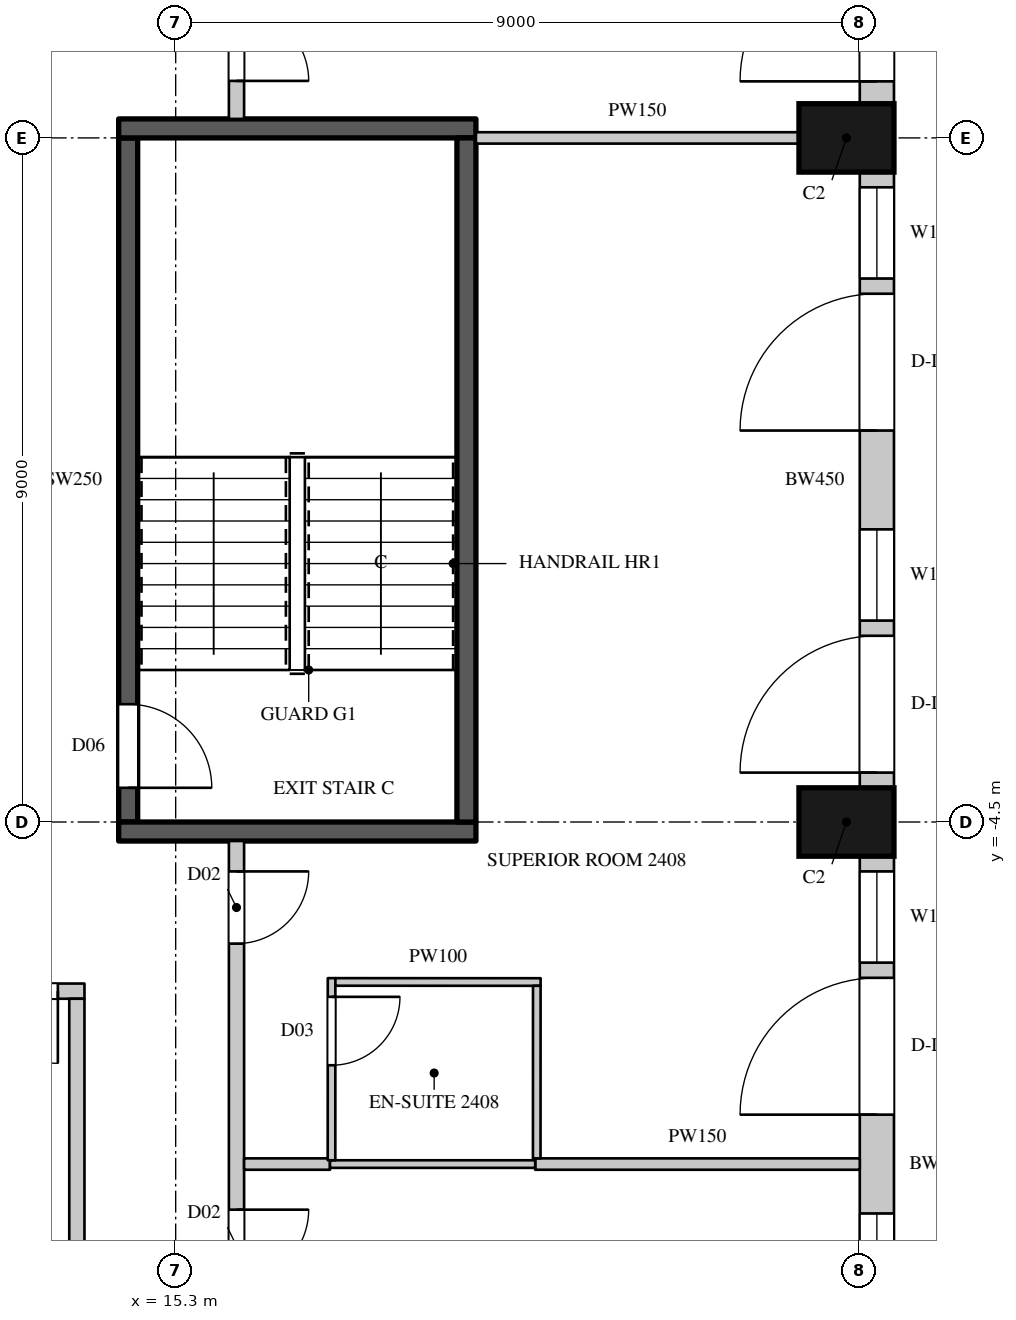
"""IFC4 building model, lengths in metres.
Left out: names, types, materials, properties, quantities, classifications, styles, units other than length and angle.
Written with IfcOpenShell. Run it as: python <this file> out.ifc"""

import sys

from ifc_helpers import new_model, si_unit, direction, frame, frame_2d, origin, origin_2d, place, context, subcontext, project, spatial, rectangle, extrude, element, fill, save


model = new_model("IFC4")
c1 = context("Model", 3, precision=1e-05, world=origin(), true_north=direction((0.0, 1.0)))
c2 = subcontext(c1, "Body", "Model", "MODEL_VIEW")
j1 = project(units=[si_unit("LENGTHUNIT", "METRE"), si_unit("PLANEANGLEUNIT", "RADIAN")], contexts=[c1])
p1 = place(None, origin())
s1 = spatial("IfcSite", under=j1, at=p1, CompositionType="ELEMENT")
p2 = place(p1, origin())
s2 = spatial("IfcBuilding", under=s1, at=p2, CompositionType="ELEMENT")
p3 = place(p2, frame((0.0, 0.0, 116.7)))
s3 = spatial("IfcBuildingStorey", under=s2, at=p3, CompositionType="ELEMENT", Elevation=116.7)
for number, where, z_axis, x_axis in (
    (1, (24.125, -4.5, 0.0), (0.0, 0.0, 1.0), (0.0, 1.0, 0.0)),
    (2, (24.125, 4.5, 0.0), (0.0, 0.0, 1.0), (0.0, 1.0, 0.0)),
):
    element("IfcColumn", number, at=place(p3, frame(where, z_axis=z_axis, x_axis=x_axis)), inside=s3, PredefinedType="COLUMN", context=c2, shape_type="SweptSolid", body=[
        extrude(rectangle(XDim=0.9, YDim=1.25, at=origin_2d()), origin(), (0.0, 0.0, 1.0), 3.6),
    ])
p4 = place(p3, frame((24.525, -13.05, 0.0), z_axis=(0.0, 0.0, 1.0), x_axis=(0.0, 1.0, 0.0)))
e3 = element("IfcWall", 3, at=p4, inside=s3, PredefinedType="SOLIDWALL", context=c2, shape_type="SweptSolid", body=[
    extrude(rectangle(XDim=8.1, YDim=0.45, at=frame_2d((4.05, 0.0))), origin(), (0.0, 0.0, 1.0), 3.3),
])
p5 = place(p4, frame((0.2, 0.0, 0.0)))
e4 = element("IfcOpeningElement", 4, at=p5, cuts=e3, PredefinedType="OPENING", context=c2, shape_type="SweptSolid", body=[
    extrude(rectangle(XDim=1.8, YDim=2.4, at=frame_2d((0.9, 1.2))), frame((0.0, 0.235, 0.0), z_axis=(0.0, -1.0, 0.0), x_axis=(1.0, 0.0, 0.0)), (0.0, 0.0, 1.0), 0.47),
])
p6 = place(p4, frame((2.2, 0.0, 1.05)))
e5 = element("IfcOpeningElement", 5, at=p6, cuts=e3, PredefinedType="OPENING", context=c2, shape_type="SweptSolid", body=[
    extrude(rectangle(XDim=1.2, YDim=2.0, at=frame_2d((0.6, 1.0))), frame((0.0, 0.235, 0.0), z_axis=(0.0, -1.0, 0.0), x_axis=(1.0, 0.0, 0.0)), (0.0, 0.0, 1.0), 0.47),
])
p7 = place(p4, frame((4.7, 0.0, 0.0)))
e6 = element("IfcOpeningElement", 6, at=p7, cuts=e3, PredefinedType="OPENING", context=c2, shape_type="SweptSolid", body=[
    extrude(rectangle(XDim=1.8, YDim=2.4, at=frame_2d((0.9, 1.2))), frame((0.0, 0.235, 0.0), z_axis=(0.0, -1.0, 0.0), x_axis=(1.0, 0.0, 0.0)), (0.0, 0.0, 1.0), 0.47),
])
p8 = place(p4, frame((6.7, 0.0, 1.05)))
e7 = element("IfcOpeningElement", 7, at=p8, cuts=e3, PredefinedType="OPENING", context=c2, shape_type="SweptSolid", body=[
    extrude(rectangle(XDim=1.2, YDim=2.0, at=frame_2d((0.6, 1.0))), frame((0.0, 0.235, 0.0), z_axis=(0.0, -1.0, 0.0), x_axis=(1.0, 0.0, 0.0)), (0.0, 0.0, 1.0), 0.47),
])
p9 = place(p3, frame((24.525, -4.05, 0.0), z_axis=(0.0, 0.0, 1.0), x_axis=(0.0, 1.0, 0.0)))
e8 = element("IfcWall", 8, at=p9, inside=s3, PredefinedType="SOLIDWALL", context=c2, shape_type="SweptSolid", body=[
    extrude(rectangle(XDim=8.1, YDim=0.45, at=frame_2d((4.05, 0.0))), origin(), (0.0, 0.0, 1.0), 3.3),
])
p10 = place(p9, frame((0.2, 0.0, 0.0)))
e9 = element("IfcOpeningElement", 9, at=p10, cuts=e8, PredefinedType="OPENING", context=c2, shape_type="SweptSolid", body=[
    extrude(rectangle(XDim=1.8, YDim=2.4, at=frame_2d((0.9, 1.2))), frame((0.0, 0.235, 0.0), z_axis=(0.0, -1.0, 0.0), x_axis=(1.0, 0.0, 0.0)), (0.0, 0.0, 1.0), 0.47),
])
p11 = place(p9, frame((2.2, 0.0, 1.05)))
e10 = element("IfcOpeningElement", 10, at=p11, cuts=e8, PredefinedType="OPENING", context=c2, shape_type="SweptSolid", body=[
    extrude(rectangle(XDim=1.2, YDim=2.0, at=frame_2d((0.6, 1.0))), frame((0.0, 0.235, 0.0), z_axis=(0.0, -1.0, 0.0), x_axis=(1.0, 0.0, 0.0)), (0.0, 0.0, 1.0), 0.47),
])
p12 = place(p9, frame((4.7, 0.0, 0.0)))
e11 = element("IfcOpeningElement", 11, at=p12, cuts=e8, PredefinedType="OPENING", context=c2, shape_type="SweptSolid", body=[
    extrude(rectangle(XDim=1.8, YDim=2.4, at=frame_2d((0.9, 1.2))), frame((0.0, 0.235, 0.0), z_axis=(0.0, -1.0, 0.0), x_axis=(1.0, 0.0, 0.0)), (0.0, 0.0, 1.0), 0.47),
])
p13 = place(p9, frame((6.7, 0.0, 1.05)))
e12 = element("IfcOpeningElement", 12, at=p13, cuts=e8, PredefinedType="OPENING", context=c2, shape_type="SweptSolid", body=[
    extrude(rectangle(XDim=1.2, YDim=2.0, at=frame_2d((0.6, 1.0))), frame((0.0, 0.235, 0.0), z_axis=(0.0, -1.0, 0.0), x_axis=(1.0, 0.0, 0.0)), (0.0, 0.0, 1.0), 0.47),
])
p14 = place(p3, frame((24.525, 4.95, 0.0), z_axis=(0.0, 0.0, 1.0), x_axis=(0.0, 1.0, 0.0)))
e13 = element("IfcWall", 13, at=p14, inside=s3, PredefinedType="SOLIDWALL", context=c2, shape_type="SweptSolid", body=[
    extrude(rectangle(XDim=8.439, YDim=0.45, at=frame_2d((4.219, 0.0))), origin(), (0.0, 0.0, 1.0), 3.3),
])
p15 = place(p14, frame((0.294, 0.0, 0.0)))
e14 = element("IfcOpeningElement", 14, at=p15, cuts=e13, PredefinedType="OPENING", context=c2, shape_type="SweptSolid", body=[
    extrude(rectangle(XDim=1.8, YDim=2.4, at=frame_2d((0.9, 1.2))), frame((0.0, 0.235, 0.0), z_axis=(0.0, -1.0, 0.0), x_axis=(1.0, 0.0, 0.0)), (0.0, 0.0, 1.0), 0.47),
])
p16 = place(p14, frame((2.294, 0.0, 1.05)))
e15 = element("IfcOpeningElement", 15, at=p16, cuts=e13, PredefinedType="OPENING", context=c2, shape_type="SweptSolid", body=[
    extrude(rectangle(XDim=1.2, YDim=2.0, at=frame_2d((0.6, 1.0))), frame((0.0, 0.235, 0.0), z_axis=(0.0, -1.0, 0.0), x_axis=(1.0, 0.0, 0.0)), (0.0, 0.0, 1.0), 0.47),
])
p17 = place(p14, frame((5.232, 0.0, 1.05)))
e16 = element("IfcOpeningElement", 16, at=p17, cuts=e13, PredefinedType="OPENING", context=c2, shape_type="SweptSolid", body=[
    extrude(rectangle(XDim=2.7, YDim=2.0, at=frame_2d((1.35, 1.0))), frame((0.0, 0.235, 0.0), z_axis=(0.0, -1.0, 0.0), x_axis=(1.0, 0.0, 0.0)), (0.0, 0.0, 1.0), 0.47),
])
p18 = place(p3, frame((10.5, -6.725, 0.0), z_axis=(0.0, 0.0, 1.0), x_axis=(1.0, 0.0, 0.0)))
e17 = element("IfcWall", 17, at=p18, inside=s3, PredefinedType="PARTITIONING", context=c2, shape_type="SweptSolid", body=[
    extrude(rectangle(XDim=3.6, YDim=0.2, at=frame_2d((1.8, 0.0))), origin(), (0.0, 0.0, 1.0), 3.3),
])
p19 = place(p18, frame((2.3, 0.0, 0.0)))
e18 = element("IfcOpeningElement", 18, at=p19, cuts=e17, PredefinedType="OPENING", context=c2, shape_type="SweptSolid", body=[
    extrude(rectangle(XDim=0.95, YDim=2.2, at=frame_2d((0.475, 1.1))), frame((0.0, 0.11, 0.0), z_axis=(0.0, -1.0, 0.0), x_axis=(1.0, 0.0, 0.0)), (0.0, 0.0, 1.0), 0.22),
])
p20 = place(p3, frame((14.0, -15.3, 0.0), z_axis=(0.0, 0.0, 1.0), x_axis=(0.0, 1.0, 0.0)))
e19 = element("IfcWall", 19, at=p20, inside=s3, PredefinedType="PARTITIONING", context=c2, shape_type="SweptSolid", body=[
    extrude(rectangle(XDim=8.475, YDim=0.2, at=frame_2d((4.238, 0.0))), origin(), (0.0, 0.0, 1.0), 3.3),
])
p21 = place(p3, frame((16.1, -17.5, 0.0), z_axis=(0.0, 0.0, 1.0), x_axis=(0.0, 1.0, 0.0)))
e20 = element("IfcWall", 20, at=p21, inside=s3, PredefinedType="PARTITIONING", context=c2, shape_type="SweptSolid", body=[
    extrude(rectangle(XDim=12.75, YDim=0.2, at=frame_2d((6.375, 0.0))), origin(), (0.0, 0.0, 1.0), 3.3),
])
p22 = place(p21, frame((2.75, 0.0, 0.0)))
e21 = element("IfcOpeningElement", 21, at=p22, cuts=e20, PredefinedType="OPENING", context=c2, shape_type="SweptSolid", body=[
    extrude(rectangle(XDim=0.95, YDim=2.2, at=frame_2d((0.475, 1.1))), frame((0.0, 0.11, 0.0), z_axis=(0.0, -1.0, 0.0), x_axis=(1.0, 0.0, 0.0)), (0.0, 0.0, 1.0), 0.22),
])
p23 = place(p21, frame((6.95, 0.0, 0.0)))
e22 = element("IfcOpeningElement", 22, at=p23, cuts=e20, PredefinedType="OPENING", context=c2, shape_type="SweptSolid", body=[
    extrude(rectangle(XDim=0.95, YDim=2.2, at=frame_2d((0.475, 1.1))), frame((0.0, 0.11, 0.0), z_axis=(0.0, -1.0, 0.0), x_axis=(1.0, 0.0, 0.0)), (0.0, 0.0, 1.0), 0.22),
])
p24 = place(p21, frame((11.4, 0.0, 0.0)))
e23 = element("IfcOpeningElement", 23, at=p24, cuts=e20, PredefinedType="OPENING", context=c2, shape_type="SweptSolid", body=[
    extrude(rectangle(XDim=0.95, YDim=2.2, at=frame_2d((0.475, 1.1))), frame((0.0, 0.11, 0.0), z_axis=(0.0, -1.0, 0.0), x_axis=(1.0, 0.0, 0.0)), (0.0, 0.0, 1.0), 0.22),
])
p25 = place(p3, frame((16.1, 4.75, 0.0), z_axis=(0.0, 0.0, 1.0), x_axis=(0.0, 1.0, 0.0)))
e24 = element("IfcWall", 24, at=p25, inside=s3, PredefinedType="PARTITIONING", context=c2, shape_type="SweptSolid", body=[
    extrude(rectangle(XDim=12.65, YDim=0.2, at=frame_2d((6.325, 0.0))), origin(), (0.0, 0.0, 1.0), 3.3),
])
p26 = place(p25, frame((0.5, 0.0, 0.0)))
e25 = element("IfcOpeningElement", 25, at=p26, cuts=e24, PredefinedType="OPENING", context=c2, shape_type="SweptSolid", body=[
    extrude(rectangle(XDim=0.95, YDim=2.2, at=frame_2d((0.475, 1.1))), frame((0.0, 0.11, 0.0), z_axis=(0.0, -1.0, 0.0), x_axis=(1.0, 0.0, 0.0)), (0.0, 0.0, 1.0), 0.22),
])
p27 = place(p25, frame((6.9, 0.0, 0.0)))
e26 = element("IfcOpeningElement", 26, at=p27, cuts=e24, PredefinedType="OPENING", context=c2, shape_type="SweptSolid", body=[
    extrude(rectangle(XDim=0.95, YDim=2.2, at=frame_2d((0.475, 1.1))), frame((0.0, 0.11, 0.0), z_axis=(0.0, -1.0, 0.0), x_axis=(1.0, 0.0, 0.0)), (0.0, 0.0, 1.0), 0.22),
])
p28 = place(p3, frame((16.2, -9.0, 0.0), z_axis=(0.0, 0.0, 1.0), x_axis=(1.0, 0.0, 0.0)))
e27 = element("IfcWall", 27, at=p28, inside=s3, PredefinedType="PARTITIONING", context=c2, shape_type="SweptSolid", body=[
    extrude(rectangle(XDim=1.13, YDim=0.15, at=frame_2d((0.565, 0.0))), origin(), (0.0, 0.0, 1.0), 2.65),
])
p29 = place(p3, frame((19.25, 4.5, 0.0), z_axis=(0.0, 0.0, 1.0), x_axis=(1.0, 0.0, 0.0)))
e28 = element("IfcWall", 28, at=p29, inside=s3, PredefinedType="PARTITIONING", context=c2, shape_type="SweptSolid", body=[
    extrude(rectangle(XDim=4.25, YDim=0.15, at=frame_2d((2.125, 0.0))), origin(), (0.0, 0.0, 1.0), 3.3),
])
p30 = place(p3, frame((20.03, -9.0, 0.0), z_axis=(0.0, 0.0, 1.0), x_axis=(1.0, 0.0, 0.0)))
e29 = element("IfcWall", 29, at=p30, inside=s3, PredefinedType="PARTITIONING", context=c2, shape_type="SweptSolid", body=[
    extrude(rectangle(XDim=4.27, YDim=0.15, at=frame_2d((2.135, 0.0))), origin(), (0.0, 0.0, 1.0), 2.65),
])
p31 = place(p3, frame((14.675, -4.5, 0.0), z_axis=(0.0, 0.0, 1.0), x_axis=(0.0, 1.0, 0.0)))
e30 = element("IfcWall", 30, at=p31, inside=s3, PredefinedType="SHEAR", context=c2, shape_type="SweptSolid", body=[
    extrude(rectangle(XDim=9.0, YDim=0.25, at=frame_2d((4.5, 0.0))), origin(), (0.0, 0.0, 1.0), 3.3),
])
p32 = place(p31, frame((0.45, 0.0, 0.0)))
e31 = element("IfcOpeningElement", 31, at=p32, cuts=e30, PredefinedType="OPENING", context=c2, shape_type="SweptSolid", body=[
    extrude(rectangle(XDim=1.1, YDim=2.2, at=frame_2d((0.55, 1.1))), frame((0.0, 0.135, 0.0), z_axis=(0.0, -1.0, 0.0), x_axis=(1.0, 0.0, 0.0)), (0.0, 0.0, 1.0), 0.27),
])
for number, where, z_axis, x_axis in (
    (32, (14.55, -4.625, 0.0), (0.0, 0.0, 1.0), (1.0, 0.0, 0.0)),
    (33, (14.55, 4.625, 0.0), (0.0, 0.0, 1.0), (1.0, 0.0, 0.0)),
):
    element("IfcWall", number, at=place(p3, frame(where, z_axis=z_axis, x_axis=x_axis)), inside=s3, PredefinedType="SHEAR", context=c2, shape_type="SweptSolid", body=[
        extrude(rectangle(XDim=4.7, YDim=0.25, at=frame_2d((2.35, 0.0))), origin(), (0.0, 0.0, 1.0), 3.3),
    ])
p33 = place(p3, frame((19.125, -4.5, 0.0), z_axis=(0.0, 0.0, 1.0), x_axis=(0.0, 1.0, 0.0)))
e34 = element("IfcWall", 34, at=p33, inside=s3, PredefinedType="SHEAR", context=c2, shape_type="SweptSolid", body=[
    extrude(rectangle(XDim=9.0, YDim=0.25, at=frame_2d((4.5, 0.0))), origin(), (0.0, 0.0, 1.0), 3.3),
])
p34 = place(p3, frame((17.33, -9.0, 0.0), z_axis=(0.0, 0.0, 1.0), x_axis=(1.0, 0.0, 0.0)))
e35 = element("IfcWall", 35, at=p34, inside=s3, PredefinedType="PARTITIONING", context=c2, shape_type="SweptSolid", body=[
    extrude(rectangle(XDim=2.7, YDim=0.1, at=frame_2d((1.35, 0.0))), origin(), (0.0, 0.0, 1.0), 2.65),
])
p35 = place(p3, frame((17.35, -8.95, 0.0), z_axis=(0.0, 0.0, 1.0), x_axis=(0.000407580973, 0.999999916939, 0.0)))
e36 = element("IfcWall", 36, at=p35, inside=s3, PredefinedType="PARTITIONING", context=c2, shape_type="SweptSolid", body=[
    extrude(rectangle(XDim=2.396, YDim=0.1, at=frame_2d((1.198, 0.0))), origin(), (0.0, 0.0, 1.0), 3.3),
])
p36 = place(p35, frame((1.25, 0.0, 0.0)))
e37 = element("IfcOpeningElement", 37, at=p36, cuts=e36, PredefinedType="OPENING", context=c2, shape_type="SweptSolid", body=[
    extrude(rectangle(XDim=0.9, YDim=2.2, at=frame_2d((0.45, 1.1))), frame((0.0, 0.06, 0.0), z_axis=(0.0, -1.0, 0.0), x_axis=(1.0, 0.0, 0.0)), (0.0, 0.0, 1.0), 0.12),
])
p37 = place(p3, frame((17.401, -6.604, 0.0), z_axis=(0.0, 0.0, 1.0), x_axis=(0.9999999346, -0.000361663629, 0.0)))
e38 = element("IfcWall", 38, at=p37, inside=s3, PredefinedType="PARTITIONING", context=c2, shape_type="SweptSolid", body=[
    extrude(rectangle(XDim=2.7, YDim=0.1, at=frame_2d((1.35, 0.0))), origin(), (0.0, 0.0, 1.0), 3.3),
])
p38 = place(p3, frame((20.05, -8.925, 0.0), z_axis=(0.0, 0.0, 1.0), x_axis=(0.000430200003, 0.999999907464, 0.0)))
e39 = element("IfcWall", 39, at=p38, inside=s3, PredefinedType="PARTITIONING", context=c2, shape_type="SweptSolid", body=[
    extrude(rectangle(XDim=2.27, YDim=0.1, at=frame_2d((1.135, 0.0))), origin(), (0.0, 0.0, 1.0), 3.3),
])
p39 = place(p6, origin())
e40 = element("IfcWindow", 40, at=p39, inside=s3, PartitioningType="SINGLE_PANEL", PredefinedType="WINDOW", context=c2, shape_type="SweptSolid", body=[
    extrude(rectangle(XDim=1.2, YDim=2.0, at=frame_2d((0.6, 1.0))), frame((0.0, 0.135, 0.0), z_axis=(0.0, -1.0, 0.0), x_axis=(1.0, 0.0, 0.0)), (0.0, 0.0, 1.0), 0.06),
])
fill(e5, e40)
p40 = place(p7, origin())
e41 = element("IfcDoor", 41, at=p40, inside=s3, OperationType="SLIDING_TO_LEFT", PredefinedType="DOOR", context=c2, shape_type="SweptSolid", body=[
    extrude(rectangle(XDim=1.8, YDim=2.4, at=frame_2d((0.9, 1.2))), frame((0.0, 0.13, 0.0), z_axis=(0.0, -1.0, 0.0), x_axis=(1.0, 0.0, 0.0)), (0.0, 0.0, 1.0), 0.05),
])
fill(e6, e41)
p41 = place(p8, origin())
e42 = element("IfcWindow", 42, at=p41, inside=s3, PartitioningType="SINGLE_PANEL", PredefinedType="WINDOW", context=c2, shape_type="SweptSolid", body=[
    extrude(rectangle(XDim=1.2, YDim=2.0, at=frame_2d((0.6, 1.0))), frame((0.0, 0.135, 0.0), z_axis=(0.0, -1.0, 0.0), x_axis=(1.0, 0.0, 0.0)), (0.0, 0.0, 1.0), 0.06),
])
fill(e7, e42)
p42 = place(p10, origin())
e43 = element("IfcDoor", 43, at=p42, inside=s3, OperationType="SLIDING_TO_LEFT", PredefinedType="DOOR", context=c2, shape_type="SweptSolid", body=[
    extrude(rectangle(XDim=1.8, YDim=2.4, at=frame_2d((0.9, 1.2))), frame((0.0, 0.13, 0.0), z_axis=(0.0, -1.0, 0.0), x_axis=(1.0, 0.0, 0.0)), (0.0, 0.0, 1.0), 0.05),
])
fill(e9, e43)
p43 = place(p11, origin())
e44 = element("IfcWindow", 44, at=p43, inside=s3, PartitioningType="SINGLE_PANEL", PredefinedType="WINDOW", context=c2, shape_type="SweptSolid", body=[
    extrude(rectangle(XDim=1.2, YDim=2.0, at=frame_2d((0.6, 1.0))), frame((0.0, 0.135, 0.0), z_axis=(0.0, -1.0, 0.0), x_axis=(1.0, 0.0, 0.0)), (0.0, 0.0, 1.0), 0.06),
])
fill(e10, e44)
p44 = place(p12, origin())
e45 = element("IfcDoor", 45, at=p44, inside=s3, OperationType="SLIDING_TO_LEFT", PredefinedType="DOOR", context=c2, shape_type="SweptSolid", body=[
    extrude(rectangle(XDim=1.8, YDim=2.4, at=frame_2d((0.9, 1.2))), frame((0.0, 0.13, 0.0), z_axis=(0.0, -1.0, 0.0), x_axis=(1.0, 0.0, 0.0)), (0.0, 0.0, 1.0), 0.05),
])
fill(e11, e45)
p45 = place(p13, origin())
e46 = element("IfcWindow", 46, at=p45, inside=s3, PartitioningType="SINGLE_PANEL", PredefinedType="WINDOW", context=c2, shape_type="SweptSolid", body=[
    extrude(rectangle(XDim=1.2, YDim=2.0, at=frame_2d((0.6, 1.0))), frame((0.0, 0.135, 0.0), z_axis=(0.0, -1.0, 0.0), x_axis=(1.0, 0.0, 0.0)), (0.0, 0.0, 1.0), 0.06),
])
fill(e12, e46)
p46 = place(p15, origin())
e47 = element("IfcDoor", 47, at=p46, inside=s3, OperationType="SLIDING_TO_LEFT", PredefinedType="DOOR", context=c2, shape_type="SweptSolid", body=[
    extrude(rectangle(XDim=1.8, YDim=2.4, at=frame_2d((0.9, 1.2))), frame((0.0, 0.13, 0.0), z_axis=(0.0, -1.0, 0.0), x_axis=(1.0, 0.0, 0.0)), (0.0, 0.0, 1.0), 0.05),
])
fill(e14, e47)
p47 = place(p19, origin())
e48 = element("IfcDoor", 48, at=p47, inside=s3, OperationType="SINGLE_SWING_LEFT", PredefinedType="DOOR", context=c2, shape_type="SweptSolid", body=[
    extrude(rectangle(XDim=0.95, YDim=2.2, at=frame_2d((0.475, 1.1))), frame((0.0, 0.025, 0.0), z_axis=(0.0, -1.0, 0.0), x_axis=(1.0, 0.0, 0.0)), (0.0, 0.0, 1.0), 0.05),
])
fill(e18, e48)
p48 = place(p23, origin())
e49 = element("IfcDoor", 49, at=p48, inside=s3, OperationType="SINGLE_SWING_LEFT", PredefinedType="DOOR", context=c2, shape_type="SweptSolid", body=[
    extrude(rectangle(XDim=0.95, YDim=2.2, at=frame_2d((0.475, 1.1))), frame((0.0, 0.025, 0.0), z_axis=(0.0, -1.0, 0.0), x_axis=(1.0, 0.0, 0.0)), (0.0, 0.0, 1.0), 0.05),
])
fill(e22, e49)
p49 = place(p24, origin())
e50 = element("IfcDoor", 50, at=p49, inside=s3, OperationType="SINGLE_SWING_LEFT", PredefinedType="DOOR", context=c2, shape_type="SweptSolid", body=[
    extrude(rectangle(XDim=0.95, YDim=2.2, at=frame_2d((0.475, 1.1))), frame((0.0, 0.025, 0.0), z_axis=(0.0, -1.0, 0.0), x_axis=(1.0, 0.0, 0.0)), (0.0, 0.0, 1.0), 0.05),
])
fill(e23, e50)
p50 = place(p36, origin())
e51 = element("IfcDoor", 51, at=p50, inside=s3, OperationType="SINGLE_SWING_LEFT", PredefinedType="DOOR", context=c2, shape_type="SweptSolid", body=[
    extrude(rectangle(XDim=0.9, YDim=2.2, at=frame_2d((0.45, 1.1))), frame((0.0, 0.025, 0.0), z_axis=(0.0, -1.0, 0.0), x_axis=(1.0, 0.0, 0.0)), (0.0, 0.0, 1.0), 0.05),
])
fill(e37, e51)
p51 = place(p26, origin())
e52 = element("IfcDoor", 52, at=p51, inside=s3, OperationType="SINGLE_SWING_RIGHT", PredefinedType="DOOR", context=c2, shape_type="SweptSolid", body=[
    extrude(rectangle(XDim=0.95, YDim=2.2, at=frame_2d((0.475, 1.1))), frame((0.0, 0.025, 0.0), z_axis=(0.0, -1.0, 0.0), x_axis=(1.0, 0.0, 0.0)), (0.0, 0.0, 1.0), 0.05),
])
fill(e25, e52)
p52 = place(p32, origin())
e53 = element("IfcDoor", 53, at=p52, inside=s3, OperationType="SINGLE_SWING_RIGHT", PredefinedType="DOOR", context=c2, shape_type="SweptSolid", body=[
    extrude(rectangle(XDim=1.1, YDim=2.2, at=frame_2d((0.55, 1.1))), frame((0.0, 0.025, 0.0), z_axis=(0.0, -1.0, 0.0), x_axis=(1.0, 0.0, 0.0)), (0.0, 0.0, 1.0), 0.05),
])
fill(e31, e53)
save(model, sys.argv[1])
